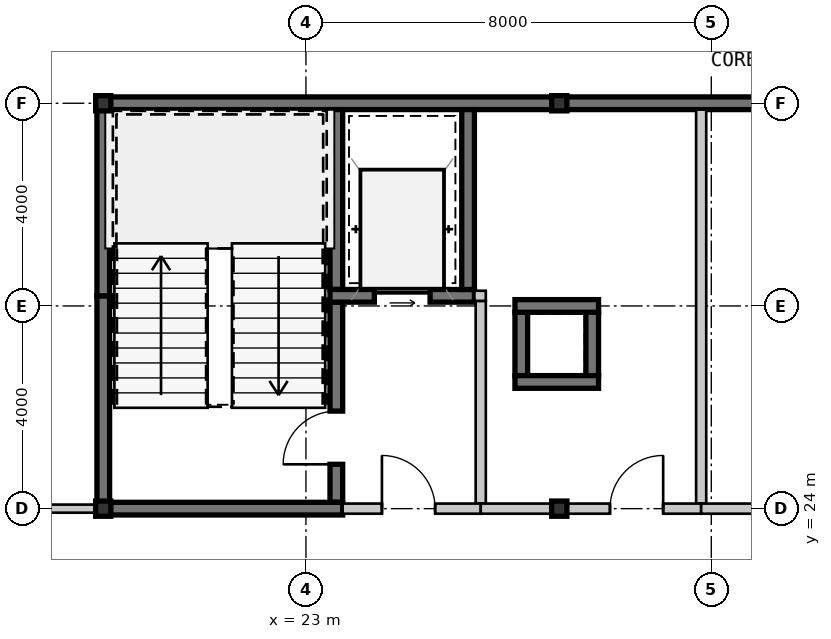
"""IFC4 building model, lengths in metres.
Left out: names, types, materials, properties, quantities, classifications, styles, units other than length and angle.
Written with IfcOpenShell. Run it as: python <this file> out.ifc"""

import sys

from ifc_helpers import new_model, si_unit, direction, frame, frame_2d, origin, origin_2d, place, context, subcontext, project, spatial, rectangle, hollow_rectangle, extrude, source, transform, mapped, element, fill, save


model = new_model("IFC4")
c1 = context("Model", 3, precision=1e-05, world=origin(), true_north=direction((0.0, 1.0)))
c2 = subcontext(c1, "Body", "Model", "MODEL_VIEW")
j1 = project(units=[si_unit("LENGTHUNIT", "METRE"), si_unit("PLANEANGLEUNIT", "RADIAN")], contexts=[c1])
p1 = place(None, origin())
s1 = spatial("IfcSite", under=j1, at=p1, CompositionType="ELEMENT")
p2 = place(p1, origin())
s2 = spatial("IfcBuilding", under=s1, at=p2, CompositionType="ELEMENT")
p3 = place(p2, frame((0.0, 0.0, 211.4)))
s3 = spatial("IfcBuildingStorey", under=s2, at=p3, CompositionType="ELEMENT", Elevation=211.4)
m1 = source(origin(), c2, "Body", "SweptSolid", [
    extrude(hollow_rectangle(XDim=0.3, YDim=0.3, WallThickness=0.012, at=origin_2d()), origin(), (0.0, 0.0, 1.0), 3.15),
])
for number, where, z_axis, x_axis in (
    (1, (19.0, 24.0, 0.0), (0.0, 0.0, 1.0), (1.0, 0.0, 0.0)),
    (2, (28.0, 24.0, 0.0), (0.0, 0.0, 1.0), (1.0, 0.0, 0.0)),
    (3, (19.0, 32.0, 0.0), (0.0, 0.0, 1.0), (1.0, 0.0, 0.0)),
    (4, (28.0, 32.0, 0.0), (0.0, 0.0, 1.0), (1.0, 0.0, 0.0)),
):
    element("IfcColumn", number, at=place(p3, frame(where, z_axis=z_axis, x_axis=x_axis)), inside=s3, PredefinedType="COLUMN", context=c2, shape_type="MappedRepresentation", body=[
        mapped(m1, transform((0.0, 0.0, 0.0), scale=1.0)),
    ])
m2 = source(origin(), c2, "Body", "SweptSolid", [
    extrude(rectangle(XDim=9.125, YDim=0.25, at=frame_2d((4.562, 0.0))), origin(), (0.0, 0.0, 1.0), 2.93),
])
p4 = place(p3, frame((18.875, 32.0, 0.0), z_axis=(0.0, 0.0, 1.0), x_axis=(1.0, 0.0, 0.0)))
e5 = element("IfcWall", 5, at=p4, inside=s3, PredefinedType="SHEAR", context=c2, shape_type="MappedRepresentation", body=[
    mapped(m2, transform((0.0, 0.0, 0.0), scale=1.0)),
])
m3 = source(origin(), c2, "Body", "SweptSolid", [
    extrude(rectangle(XDim=11.2, YDim=0.25, at=frame_2d((5.6, 0.0))), origin(), (0.0, 0.0, 1.0), 2.93),
])
p5 = place(p3, frame((28.0, 32.0, 0.0), z_axis=(0.0, 0.0, 1.0), x_axis=(1.0, 0.0, 0.0)))
e6 = element("IfcWall", 6, at=p5, inside=s3, PredefinedType="SHEAR", context=c2, shape_type="MappedRepresentation", body=[
    mapped(m3, transform((0.0, 0.0, 0.0), scale=1.0)),
])
m4 = source(origin(), c2, "Body", "SweptSolid", [
    extrude(rectangle(XDim=4.075, YDim=0.25, at=frame_2d((2.038, 0.0))), origin(), (0.0, 0.0, 1.0), 2.93),
])
p6 = place(p3, frame((19.0, 24.125, 0.0), z_axis=(0.0, 0.0, 1.0), x_axis=(0.0, 1.0, 0.0)))
e7 = element("IfcWall", 7, at=p6, inside=s3, PredefinedType="SHEAR", context=c2, shape_type="MappedRepresentation", body=[
    mapped(m4, transform((0.0, 0.0, 0.0), scale=1.0)),
])
m5 = source(origin(), c2, "Body", "SweptSolid", [
    extrude(rectangle(XDim=3.675, YDim=0.25, at=frame_2d((1.837, 0.0))), origin(), (0.0, 0.0, 1.0), 2.93),
])
p7 = place(p3, frame((19.0, 28.2, 0.0), z_axis=(0.0, 0.0, 1.0), x_axis=(0.0, 1.0, 0.0)))
e8 = element("IfcWall", 8, at=p7, inside=s3, PredefinedType="SHEAR", context=c2, shape_type="MappedRepresentation", body=[
    mapped(m5, transform((0.0, 0.0, 0.0), scale=1.0)),
])
m6 = source(origin(), c2, "Body", "SweptSolid", [
    extrude(rectangle(XDim=3.55, YDim=0.25, at=frame_2d((1.775, 0.0))), origin(), (0.0, 0.0, 1.0), 2.93),
])
p8 = place(p3, frame((23.6, 28.325, 0.0), z_axis=(0.0, 0.0, 1.0), x_axis=(0.0, 1.0, 0.0)))
e9 = element("IfcWall", 9, at=p8, inside=s3, PredefinedType="SHEAR", context=c2, shape_type="MappedRepresentation", body=[
    mapped(m6, transform((0.0, 0.0, 0.0), scale=1.0)),
])
m7 = source(origin(), c2, "Body", "SweptSolid", [
    extrude(rectangle(XDim=3.95, YDim=0.25, at=frame_2d((1.975, 0.0))), origin(), (0.0, 0.0, 1.0), 2.93),
])
p9 = place(p3, frame((23.6, 24.125, 0.0), z_axis=(0.0, 0.0, 1.0), x_axis=(0.0, 1.0, 0.0)))
e10 = element("IfcWall", 10, at=p9, inside=s3, PredefinedType="SHEAR", context=c2, shape_type="MappedRepresentation", body=[
    mapped(m7, transform((0.0, 0.0, 0.0), scale=1.0)),
])
m8 = source(origin(), c2, "Body", "SweptSolid", [
    extrude(rectangle(XDim=1.05, YDim=2.1, at=frame_2d((0.525, 1.05))), frame((0.0, 0.135, 0.0), z_axis=(0.0, -1.0, 0.0), x_axis=(1.0, 0.0, 0.0)), (0.0, 0.0, 1.0), 0.27),
])
p10 = place(p9, frame((0.75, 0.0, 0.0)))
e11 = element("IfcOpeningElement", 11, at=p10, cuts=e10, PredefinedType="OPENING", context=c2, shape_type="MappedRepresentation", body=[
    mapped(m8, transform((0.0, 0.0, 0.0), scale=1.0)),
])
m9 = source(origin(), c2, "Body", "SweptSolid", [
    extrude(rectangle(XDim=4.85, YDim=0.25, at=frame_2d((2.425, 0.0))), origin(), (0.0, 0.0, 1.0), 2.93),
])
p11 = place(p3, frame((18.875, 24.0, 0.0), z_axis=(0.0, 0.0, 1.0), x_axis=(1.0, 0.0, 0.0)))
e12 = element("IfcWall", 12, at=p11, inside=s3, PredefinedType="SHEAR", context=c2, shape_type="MappedRepresentation", body=[
    mapped(m9, transform((0.0, 0.0, 0.0), scale=1.0)),
])
m10 = source(origin(), c2, "Body", "SweptSolid", [
    extrude(rectangle(XDim=2.85, YDim=0.25, at=frame_2d((1.425, 0.0))), origin(), (0.0, 0.0, 1.0), 2.93),
])
p12 = place(p3, frame((23.475, 28.2, 0.0), z_axis=(0.0, 0.0, 1.0), x_axis=(1.0, 0.0, 0.0)))
e13 = element("IfcWall", 13, at=p12, inside=s3, PredefinedType="SHEAR", context=c2, shape_type="MappedRepresentation", body=[
    mapped(m10, transform((0.0, 0.0, 0.0), scale=1.0)),
])
m11 = source(origin(), c2, "Body", "SweptSolid", [
    extrude(rectangle(XDim=1.1, YDim=2.15, at=frame_2d((0.55, 1.075))), frame((0.0, 0.135, 0.0), z_axis=(0.0, -1.0, 0.0), x_axis=(1.0, 0.0, 0.0)), (0.0, 0.0, 1.0), 0.27),
])
p13 = place(p12, frame((0.875, 0.0, 0.0)))
e14 = element("IfcOpeningElement", 14, at=p13, cuts=e13, PredefinedType="OPENING", context=c2, shape_type="MappedRepresentation", body=[
    mapped(m11, transform((0.0, 0.0, 0.0), scale=1.0)),
])
p14 = place(p3, frame((26.2, 28.325, 0.0), z_axis=(0.0, 0.0, 1.0), x_axis=(0.0, 1.0, 0.0)))
e15 = element("IfcWall", 15, at=p14, inside=s3, PredefinedType="SHEAR", context=c2, shape_type="MappedRepresentation", body=[
    mapped(m6, transform((0.0, 0.0, 0.0), scale=1.0)),
])
m12 = source(origin(), c2, "Body", "SweptSolid", [
    extrude(rectangle(XDim=4.0, YDim=0.2, at=frame_2d((2.0, 0.0))), origin(), (0.0, 0.0, 1.0), 2.93),
])
p15 = place(p3, frame((26.45, 24.1, 0.0), z_axis=(0.0, 0.0, 1.0), x_axis=(0.0, 1.0, 0.0)))
e16 = element("IfcWall", 16, at=p15, inside=s3, PredefinedType="SOLIDWALL", context=c2, shape_type="MappedRepresentation", body=[
    mapped(m12, transform((0.0, 0.0, 0.0), scale=1.0)),
])
m13 = source(origin(), c2, "Body", "SweptSolid", [
    extrude(rectangle(XDim=2.725, YDim=0.2, at=frame_2d((1.362, 0.0))), origin(), (0.0, 0.0, 1.0), 2.47),
])
p16 = place(p3, frame((23.725, 24.0, 0.0), z_axis=(0.0, 0.0, 1.0), x_axis=(1.0, 0.0, 0.0)))
e17 = element("IfcWall", 17, at=p16, inside=s3, PredefinedType="SOLIDWALL", context=c2, shape_type="MappedRepresentation", body=[
    mapped(m13, transform((0.0, 0.0, 0.0), scale=1.0)),
])
m14 = source(origin(), c2, "Body", "SweptSolid", [
    extrude(rectangle(XDim=1.05, YDim=2.1, at=frame_2d((0.525, 1.05))), frame((0.0, 0.11, 0.0), z_axis=(0.0, -1.0, 0.0), x_axis=(1.0, 0.0, 0.0)), (0.0, 0.0, 1.0), 0.22),
])
p17 = place(p16, frame((0.775, 0.0, 0.0)))
e18 = element("IfcOpeningElement", 18, at=p17, cuts=e17, PredefinedType="OPENING", context=c2, shape_type="MappedRepresentation", body=[
    mapped(m14, transform((0.0, 0.0, 0.0), scale=1.0)),
])
m15 = source(origin(), c2, "Body", "SweptSolid", [
    extrude(rectangle(XDim=1.25, YDim=0.25, at=frame_2d((0.625, 0.0))), origin(), (0.0, 0.0, 1.0), 2.93),
])
for number, where, z_axis, x_axis in (
    (19, (28.65, 26.625, 0.0), (0.0, 0.0, 1.0), (0.0, 1.0, 0.0)),
    (20, (27.25, 27.875, 0.0), (0.0, 0.0, 1.0), (0.0, -1.0, 0.0)),
):
    element("IfcWall", number, at=place(p3, frame(where, z_axis=z_axis, x_axis=x_axis)), inside=s3, PredefinedType="SHEAR", context=c2, shape_type="MappedRepresentation", body=[
        mapped(m15, transform((0.0, 0.0, 0.0), scale=1.0)),
    ])
m16 = source(origin(), c2, "Body", "SweptSolid", [
    extrude(rectangle(XDim=1.65, YDim=0.25, at=frame_2d((0.825, 0.0))), origin(), (0.0, 0.0, 1.0), 2.93),
])
for number, where, z_axis, x_axis in (
    (21, (28.775, 28.0, 0.0), (0.0, 0.0, 1.0), (-1.0, 0.0, 0.0)),
    (22, (27.125, 26.5, 0.0), (0.0, 0.0, 1.0), (1.0, 0.0, 0.0)),
):
    element("IfcWall", number, at=place(p3, frame(where, z_axis=z_axis, x_axis=x_axis)), inside=s3, PredefinedType="SHEAR", context=c2, shape_type="MappedRepresentation", body=[
        mapped(m16, transform((0.0, 0.0, 0.0), scale=1.0)),
    ])
m17 = source(origin(), c2, "Body", "SweptSolid", [
    extrude(rectangle(XDim=7.775, YDim=0.2, at=frame_2d((3.887, 0.0))), origin(), (0.0, 0.0, 1.0), 2.93),
])
p18 = place(p3, frame((30.8, 31.875, 0.0), z_axis=(0.0, 0.0, 1.0), x_axis=(0.0, -1.0, 0.0)))
e23 = element("IfcWall", 23, at=p18, inside=s3, PredefinedType="SOLIDWALL", context=c2, shape_type="MappedRepresentation", body=[
    mapped(m17, transform((0.0, 0.0, 0.0), scale=1.0)),
])
m18 = source(origin(), c2, "Body", "SweptSolid", [
    extrude(rectangle(XDim=4.35, YDim=0.2, at=frame_2d((2.175, 0.0))), origin(), (0.0, 0.0, 1.0), 2.47),
])
p19 = place(p3, frame((30.8, 24.0, 0.0), z_axis=(0.0, 0.0, 1.0), x_axis=(-1.0, 0.0, 0.0)))
e24 = element("IfcWall", 24, at=p19, inside=s3, PredefinedType="SOLIDWALL", context=c2, shape_type="MappedRepresentation", body=[
    mapped(m18, transform((0.0, 0.0, 0.0), scale=1.0)),
])
p20 = place(p19, frame((0.75, 0.0, 0.0)))
e25 = element("IfcOpeningElement", 25, at=p20, cuts=e24, PredefinedType="OPENING", context=c2, shape_type="MappedRepresentation", body=[
    mapped(m14, transform((0.0, 0.0, 0.0), scale=1.0)),
])
m19 = source(origin(), c2, "Body", "SweptSolid", [
    extrude(rectangle(XDim=4.35, YDim=0.2, at=frame_2d((2.175, 0.0))), origin(), (0.0, 0.0, 1.0), 2.47),
])
p21 = place(p3, frame((35.15, 24.0, 0.0), z_axis=(0.0, 0.0, 1.0), x_axis=(-1.0, 0.0, 0.0)))
e26 = element("IfcWall", 26, at=p21, inside=s3, PredefinedType="SOLIDWALL", context=c2, shape_type="MappedRepresentation", body=[
    mapped(m19, transform((0.0, 0.0, 0.0), scale=1.0)),
])
p22 = place(p21, frame((1.65, 0.0, 0.0)))
e27 = element("IfcOpeningElement", 27, at=p22, cuts=e26, PredefinedType="OPENING", context=c2, shape_type="MappedRepresentation", body=[
    mapped(m14, transform((0.0, 0.0, 0.0), scale=1.0)),
])
m20 = source(origin(), c2, "Body", "SweptSolid", [
    extrude(rectangle(XDim=6.032, YDim=0.16, at=frame_2d((3.016, 0.0))), origin(), (0.0, 0.0, 1.0), 2.93),
])
p23 = place(p3, frame((12.843, 24.0, 0.0), z_axis=(0.0, 0.0, 1.0), x_axis=(1.0, 0.0, 0.0)))
e28 = element("IfcWall", 28, at=p23, inside=s3, PredefinedType="PARTITIONING", context=c2, shape_type="MappedRepresentation", body=[
    mapped(m20, transform((0.0, 0.0, 0.0), scale=1.0)),
])
m21 = source(origin(), c2, "Body", "SweptSolid", [
    extrude(rectangle(XDim=0.225, YDim=0.2, at=frame_2d((0.113, 0.0))), origin(), (0.0, 0.0, 1.0), 2.93),
])
p24 = place(p3, frame((26.325, 28.2, 0.0), z_axis=(0.0, 0.0, 1.0), x_axis=(1.0, 0.0, 0.0)))
e29 = element("IfcWall", 29, at=p24, inside=s3, PredefinedType="SOLIDWALL", context=c2, shape_type="MappedRepresentation", body=[
    mapped(m21, transform((0.0, 0.0, 0.0), scale=1.0)),
])
m22 = source(origin(), c2, "Body", "SweptSolid", [
    extrude(rectangle(XDim=1.05, YDim=2.1, at=frame_2d((0.525, 1.05))), frame((0.0, 0.025, 0.0), z_axis=(0.0, -1.0, 0.0), x_axis=(1.0, 0.0, 0.0)), (0.0, 0.0, 1.0), 0.05),
])
p25 = place(p10, origin())
e30 = element("IfcDoor", 30, at=p25, inside=s3, OperationType="SINGLE_SWING_LEFT", PredefinedType="DOOR", context=c2, shape_type="MappedRepresentation", body=[
    mapped(m22, transform((0.0, 0.0, 0.0), scale=1.0)),
])
fill(e11, e30)
m23 = source(origin(), c2, "Body", "SweptSolid", [
    extrude(rectangle(XDim=1.1, YDim=2.15, at=frame_2d((0.55, 1.075))), frame((0.0, 0.025, 0.0), z_axis=(0.0, -1.0, 0.0), x_axis=(1.0, 0.0, 0.0)), (0.0, 0.0, 1.0), 0.05),
])
p26 = place(p13, origin())
e31 = element("IfcDoor", 31, at=p26, inside=s3, OperationType="SLIDING_TO_LEFT", PredefinedType="DOOR", context=c2, shape_type="MappedRepresentation", body=[
    mapped(m23, transform((0.0, 0.0, 0.0), scale=1.0)),
])
fill(e14, e31)
p27 = place(p17, origin())
e32 = element("IfcDoor", 32, at=p27, inside=s3, OperationType="SINGLE_SWING_LEFT", PredefinedType="DOOR", context=c2, shape_type="MappedRepresentation", body=[
    mapped(m22, transform((0.0, 0.0, 0.0), scale=1.0)),
])
fill(e18, e32)
p28 = place(p20, frame((1.05, 0.0, 0.0), z_axis=(0.0, 0.0, 1.0), x_axis=(-1.0, 0.0, 0.0)))
e33 = element("IfcDoor", 33, at=p28, inside=s3, OperationType="SINGLE_SWING_RIGHT", PredefinedType="DOOR", context=c2, shape_type="MappedRepresentation", body=[
    mapped(m22, transform((0.0, 0.0, 0.0), scale=1.0)),
])
fill(e25, e33)
save(model, sys.argv[1])
